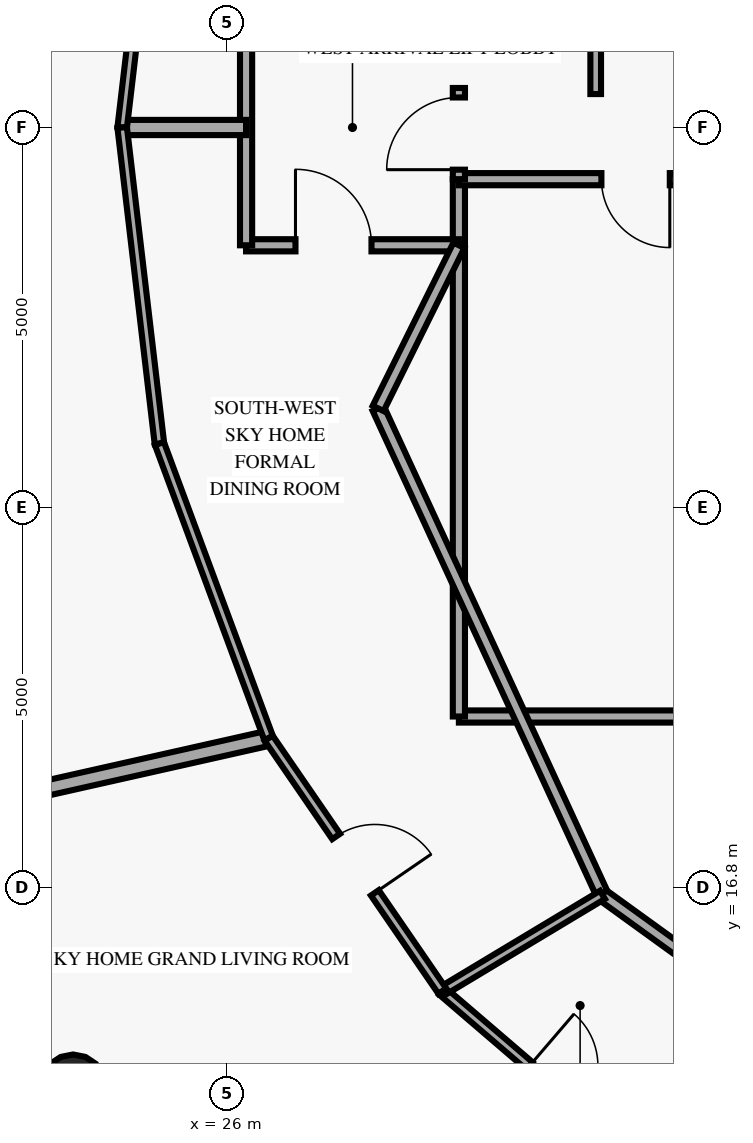
"""IFC4 building model, lengths in metres.
Left out: names, types, materials, properties, quantities, classifications, styles, units other than length and angle.
Written with IfcOpenShell. Run it as: python <this file> out.ifc"""

import sys

from ifc_helpers import new_model, si_unit, direction, frame, frame_2d, origin, origin_2d, place, context, subcontext, project, spatial, rectangle, circle, extrude, element, fill, save


model = new_model("IFC4")
c1 = context("Model", 3, precision=1e-05, world=origin(), true_north=direction((0.0, 1.0)))
c2 = subcontext(c1, "Body", "Model", "MODEL_VIEW")
j1 = project(units=[si_unit("LENGTHUNIT", "METRE"), si_unit("PLANEANGLEUNIT", "RADIAN")], contexts=[c1])
p1 = place(None, origin())
s1 = spatial("IfcSite", under=j1, at=p1, CompositionType="ELEMENT")
p2 = place(p1, origin())
s2 = spatial("IfcBuilding", under=s1, at=p2, CompositionType="ELEMENT")
p3 = place(p2, frame((0.0, 0.0, 251.95)))
s3 = spatial("IfcBuildingStorey", under=s2, at=p3, CompositionType="ELEMENT", Elevation=251.95)
p4 = place(p3, frame((23.974, 14.178, 0.0), z_axis=(0.0, 0.0, 1.0), x_axis=(1.0, 0.0, 0.0)))
e1 = element("IfcColumn", 1, at=p4, inside=s3, PredefinedType="COLUMN", context=c2, shape_type="SweptSolid", body=[
    extrude(circle(Radius=0.425, at=origin_2d()), origin(), (0.0, 0.0, 1.0), 3.39),
])
p5 = place(p3, frame((29.05, 19.05, 0.0), z_axis=(0.0, 0.0, 1.0), x_axis=(1.0, 0.0, 0.0)))
e2 = element("IfcWall", 2, at=p5, inside=s3, PredefinedType="PARTITIONING", context=c2, shape_type="SweptSolid", body=[
    extrude(rectangle(XDim=4.65, YDim=0.16, at=frame_2d((2.325, 0.0))), origin(), (0.0, 0.0, 1.0), 3.39),
])
p6 = place(p3, frame((29.05, 19.05, 0.0), z_axis=(0.0, 0.0, 1.0), x_axis=(0.0, 1.0, 0.0)))
e3 = element("IfcWall", 3, at=p6, inside=s3, PredefinedType="PARTITIONING", context=c2, shape_type="SweptSolid", body=[
    extrude(rectangle(XDim=7.07, YDim=0.16, at=frame_2d((3.535, 0.0))), origin(), (0.0, 0.0, 1.0), 3.39),
])
p7 = place(p3, frame((33.7, 26.12, 0.0), z_axis=(0.0, 0.0, 1.0), x_axis=(-1.0, 0.0, 0.0)))
e4 = element("IfcWall", 4, at=p7, inside=s3, PredefinedType="PARTITIONING", context=c2, shape_type="SweptSolid", body=[
    extrude(rectangle(XDim=4.65, YDim=0.16, at=frame_2d((2.325, 0.0))), origin(), (0.0, 0.0, 1.0), 3.39),
])
p8 = place(p7, frame((1.875, 0.0, 0.0)))
e5 = element("IfcOpeningElement", 5, at=p8, cuts=e4, PredefinedType="OPENING", context=c2, shape_type="SweptSolid", body=[
    extrude(rectangle(XDim=0.9, YDim=2.02, at=frame_2d((0.45, 1.01))), frame((0.0, 0.09, 0.0), z_axis=(0.0, -1.0, 0.0), x_axis=(1.0, 0.0, 0.0)), (0.0, 0.0, 1.0), 0.18),
])
p9 = place(p3, frame((29.05, 26.12, 0.0), z_axis=(0.0, 0.0, 1.0), x_axis=(0.0, 1.0, 0.0)))
e6 = element("IfcWall", 6, at=p9, inside=s3, PredefinedType="PARTITIONING", context=c2, shape_type="SweptSolid", body=[
    extrude(rectangle(XDim=1.2, YDim=0.16, at=frame_2d((0.6, 0.0))), origin(), (0.0, 0.0, 1.0), 3.39),
])
p10 = place(p9, frame((0.125, 0.0, 0.0)))
e7 = element("IfcOpeningElement", 7, at=p10, cuts=e6, PredefinedType="OPENING", context=c2, shape_type="SweptSolid", body=[
    extrude(rectangle(XDim=0.95, YDim=2.15, at=frame_2d((0.475, 1.075))), frame((0.0, 0.09, 0.0), z_axis=(0.0, -1.0, 0.0), x_axis=(1.0, 0.0, 0.0)), (0.0, 0.0, 1.0), 0.18),
])
p11 = place(p3, frame((30.85, 27.24, 0.0), z_axis=(0.0, 0.0, 1.0), x_axis=(0.0, 1.0, 0.0)))
e8 = element("IfcWall", 8, at=p11, inside=s3, PredefinedType="PARTITIONING", context=c2, shape_type="SweptSolid", body=[
    extrude(rectangle(XDim=1.81, YDim=0.14, at=frame_2d((0.905, 0.0))), origin(), (0.0, 0.0, 1.0), 3.39),
])
p12 = place(p3, frame((27.988, 23.104, 0.0), z_axis=(0.0, 0.0, 1.0), x_axis=(0.418656179426, -0.908144814128, 0.0)))
e9 = element("IfcWall", 9, at=p12, inside=s3, PredefinedType="PARTITIONING", context=c2, shape_type="SweptSolid", body=[
    extrude(rectangle(XDim=7.049, YDim=0.16, at=frame_2d((3.524, 0.0))), origin(), (0.0, 0.0, 1.0), 3.39),
])
p13 = place(p3, frame((30.939, 16.703, 0.0), z_axis=(0.0, 0.0, 1.0), x_axis=(0.810290119061, -0.586028943784, 0.0)))
e10 = element("IfcWall", 10, at=p13, inside=s3, PredefinedType="PARTITIONING", context=c2, shape_type="SweptSolid", body=[
    extrude(rectangle(XDim=6.306, YDim=0.16, at=frame_2d((3.153, 0.0))), origin(), (0.0, 0.0, 1.0), 3.39),
])
p14 = place(p3, frame((26.25, 25.25, 0.0), z_axis=(0.0, 0.0, 1.0), x_axis=(1.0, 0.0, 0.0)))
e11 = element("IfcWall", 11, at=p14, inside=s3, PredefinedType="PARTITIONING", context=c2, shape_type="SweptSolid", body=[
    extrude(rectangle(XDim=2.8, YDim=0.16, at=frame_2d((1.4, 0.0))), origin(), (0.0, 0.0, 1.0), 3.39),
])
p15 = place(p14, frame((0.65, 0.0, 0.0)))
e12 = element("IfcOpeningElement", 12, at=p15, cuts=e11, PredefinedType="OPENING", context=c2, shape_type="SweptSolid", body=[
    extrude(rectangle(XDim=1.0, YDim=2.02, at=frame_2d((0.5, 1.01))), frame((0.0, 0.09, 0.0), z_axis=(0.0, -1.0, 0.0), x_axis=(1.0, 0.0, 0.0)), (0.0, 0.0, 1.0), 0.18),
])
p16 = place(p3, frame((26.25, 25.25, 0.0), z_axis=(0.0, 0.0, 1.0), x_axis=(0.0, 1.0, 0.0)))
e13 = element("IfcWall", 13, at=p16, inside=s3, PredefinedType="PARTITIONING", context=c2, shape_type="SweptSolid", body=[
    extrude(rectangle(XDim=3.1, YDim=0.16, at=frame_2d((1.55, 0.0))), origin(), (0.0, 0.0, 1.0), 3.39),
])
p17 = place(p3, frame((27.988, 23.104, 0.0), z_axis=(0.0, 0.0, 1.0), x_axis=(0.443539160525, 0.896254993337, 0.0)))
e14 = element("IfcWall", 14, at=p17, inside=s3, PredefinedType="PARTITIONING", context=c2, shape_type="SweptSolid", body=[
    extrude(rectangle(XDim=2.394, YDim=0.16, at=frame_2d((1.197, 0.0))), origin(), (0.0, 0.0, 1.0), 3.39),
])
p18 = place(p3, frame((26.25, 26.8, 0.0), z_axis=(0.0, 0.0, 1.0), x_axis=(-1.0, 0.0, 0.0)))
e15 = element("IfcWall", 15, at=p18, inside=s3, PredefinedType="PARTITIONING", context=c2, shape_type="SweptSolid", body=[
    extrude(rectangle(XDim=1.63, YDim=0.2, at=frame_2d((0.815, 0.0))), origin(), (0.0, 0.0, 1.0), 3.39),
])
p19 = place(p3, frame((26.547, 18.765, 0.0), z_axis=(0.0, 0.0, 1.0), x_axis=(-0.975584694012, -0.219623552493, 0.0)))
e16 = element("IfcWall", 16, at=p19, inside=s3, PredefinedType="PARTITIONING", context=c2, shape_type="SweptSolid", body=[
    extrude(rectangle(XDim=7.408, YDim=0.2, at=frame_2d((3.704, 0.0))), origin(), (0.0, 0.0, 1.0), 3.39),
])
for number, where, z_axis, x_axis in (
    (17, (25.11, 30.959, 0.0), (0.0, 0.0, 1.0), (-0.117, -0.993, 0.0)),
    (18, (24.62, 26.8, 0.0), (0.0, 0.0, 1.0), (0.117, -0.993, 0.0)),
):
    element("IfcWall", number, at=place(p3, frame(where, z_axis=z_axis, x_axis=x_axis)), inside=s3, PredefinedType="PARTITIONING", context=c2, shape_type="SweptSolid", body=[
        extrude(rectangle(XDim=4.188, YDim=0.125, at=frame_2d((2.094, 0.0))), origin(), (0.0, 0.0, 1.0), 3.39),
    ])
p20 = place(p3, frame((25.11, 22.641, 0.0), z_axis=(0.0, 0.0, 1.0), x_axis=(0.347606700796, -0.937640432982, 0.0)))
e19 = element("IfcWall", 19, at=p20, inside=s3, PredefinedType="PARTITIONING", context=c2, shape_type="SweptSolid", body=[
    extrude(rectangle(XDim=4.134, YDim=0.125, at=frame_2d((2.067, 0.0))), origin(), (0.0, 0.0, 1.0), 3.39),
])
p21 = place(p3, frame((31.81, 12.883, 0.0), z_axis=(0.0, 0.0, 1.0), x_axis=(-0.759085259689, 0.650991220004, 0.0)))
e20 = element("IfcWall", 20, at=p21, inside=s3, PredefinedType="PARTITIONING", context=c2, shape_type="SweptSolid", body=[
    extrude(rectangle(XDim=3.923, YDim=0.125, at=frame_2d((1.961, 0.0))), origin(), (0.0, 0.0, 1.0), 3.39),
])
p22 = place(p21, frame((1.512, 0.0, 0.0)))
e21 = element("IfcOpeningElement", 21, at=p22, cuts=e20, PredefinedType="OPENING", context=c2, shape_type="SweptSolid", body=[
    extrude(rectangle(XDim=0.9, YDim=2.02, at=frame_2d((0.45, 1.01))), frame((0.0, 0.073, 0.0), z_axis=(0.0, -1.0, 0.0), x_axis=(1.0, 0.0, 0.0)), (0.0, 0.0, 1.0), 0.145),
])
p23 = place(p3, frame((30.939, 16.703, 0.0), z_axis=(0.0, 0.0, 1.0), x_axis=(-0.857186030305, -0.515006902333, 0.0)))
e22 = element("IfcWall", 22, at=p23, inside=s3, PredefinedType="PARTITIONING", context=c2, shape_type="SweptSolid", body=[
    extrude(rectangle(XDim=2.458, YDim=0.125, at=frame_2d((1.229, 0.0))), origin(), (0.0, 0.0, 1.0), 3.39),
])
p24 = place(p3, frame((28.832, 15.437, 0.0), z_axis=(0.0, 0.0, 1.0), x_axis=(-0.566023066777, 0.824389403059, 0.0)))
e23 = element("IfcWall", 23, at=p24, inside=s3, PredefinedType="PARTITIONING", context=c2, shape_type="SweptSolid", body=[
    extrude(rectangle(XDim=4.037, YDim=0.125, at=frame_2d((2.019, 0.0))), origin(), (0.0, 0.0, 1.0), 3.39),
])
p25 = place(p24, frame((1.568, 0.0, 0.0)))
e24 = element("IfcOpeningElement", 24, at=p25, cuts=e23, PredefinedType="OPENING", context=c2, shape_type="SweptSolid", body=[
    extrude(rectangle(XDim=0.9, YDim=2.02, at=frame_2d((0.45, 1.01))), frame((0.0, 0.073, 0.0), z_axis=(0.0, -1.0, 0.0), x_axis=(1.0, 0.0, 0.0)), (0.0, 0.0, 1.0), 0.145),
])
p26 = place(p8, origin())
e25 = element("IfcDoor", 25, at=p26, inside=s3, OperationType="SINGLE_SWING_LEFT", PredefinedType="DOOR", context=c2, shape_type="SweptSolid", body=[
    extrude(rectangle(XDim=0.9, YDim=2.02, at=frame_2d((0.45, 1.01))), frame((0.0, 0.025, 0.0), z_axis=(0.0, -1.0, 0.0), x_axis=(1.0, 0.0, 0.0)), (0.0, 0.0, 1.0), 0.05),
])
fill(e5, e25)
p27 = place(p10, origin())
e26 = element("IfcDoor", 26, at=p27, inside=s3, OperationType="SINGLE_SWING_RIGHT", PredefinedType="DOOR", context=c2, shape_type="SweptSolid", body=[
    extrude(rectangle(XDim=0.95, YDim=2.15, at=frame_2d((0.475, 1.075))), frame((0.0, 0.025, 0.0), z_axis=(0.0, -1.0, 0.0), x_axis=(1.0, 0.0, 0.0)), (0.0, 0.0, 1.0), 0.05),
])
fill(e7, e26)
p28 = place(p15, origin())
e27 = element("IfcDoor", 27, at=p28, inside=s3, OperationType="SINGLE_SWING_LEFT", PredefinedType="DOOR", context=c2, shape_type="SweptSolid", body=[
    extrude(rectangle(XDim=1.0, YDim=2.02, at=frame_2d((0.5, 1.01))), frame((0.0, 0.025, 0.0), z_axis=(0.0, -1.0, 0.0), x_axis=(1.0, 0.0, 0.0)), (0.0, 0.0, 1.0), 0.05),
])
fill(e12, e27)
p29 = place(p25, origin())
e28 = element("IfcDoor", 28, at=p29, inside=s3, OperationType="SINGLE_SWING_LEFT", PredefinedType="DOOR", context=c2, shape_type="SweptSolid", body=[
    extrude(rectangle(XDim=0.9, YDim=2.02, at=frame_2d((0.45, 1.01))), frame((0.0, 0.025, 0.0), z_axis=(0.0, -1.0, 0.0), x_axis=(1.0, 0.0, 0.0)), (0.0, 0.0, 1.0), 0.05),
])
fill(e24, e28)
save(model, sys.argv[1])
